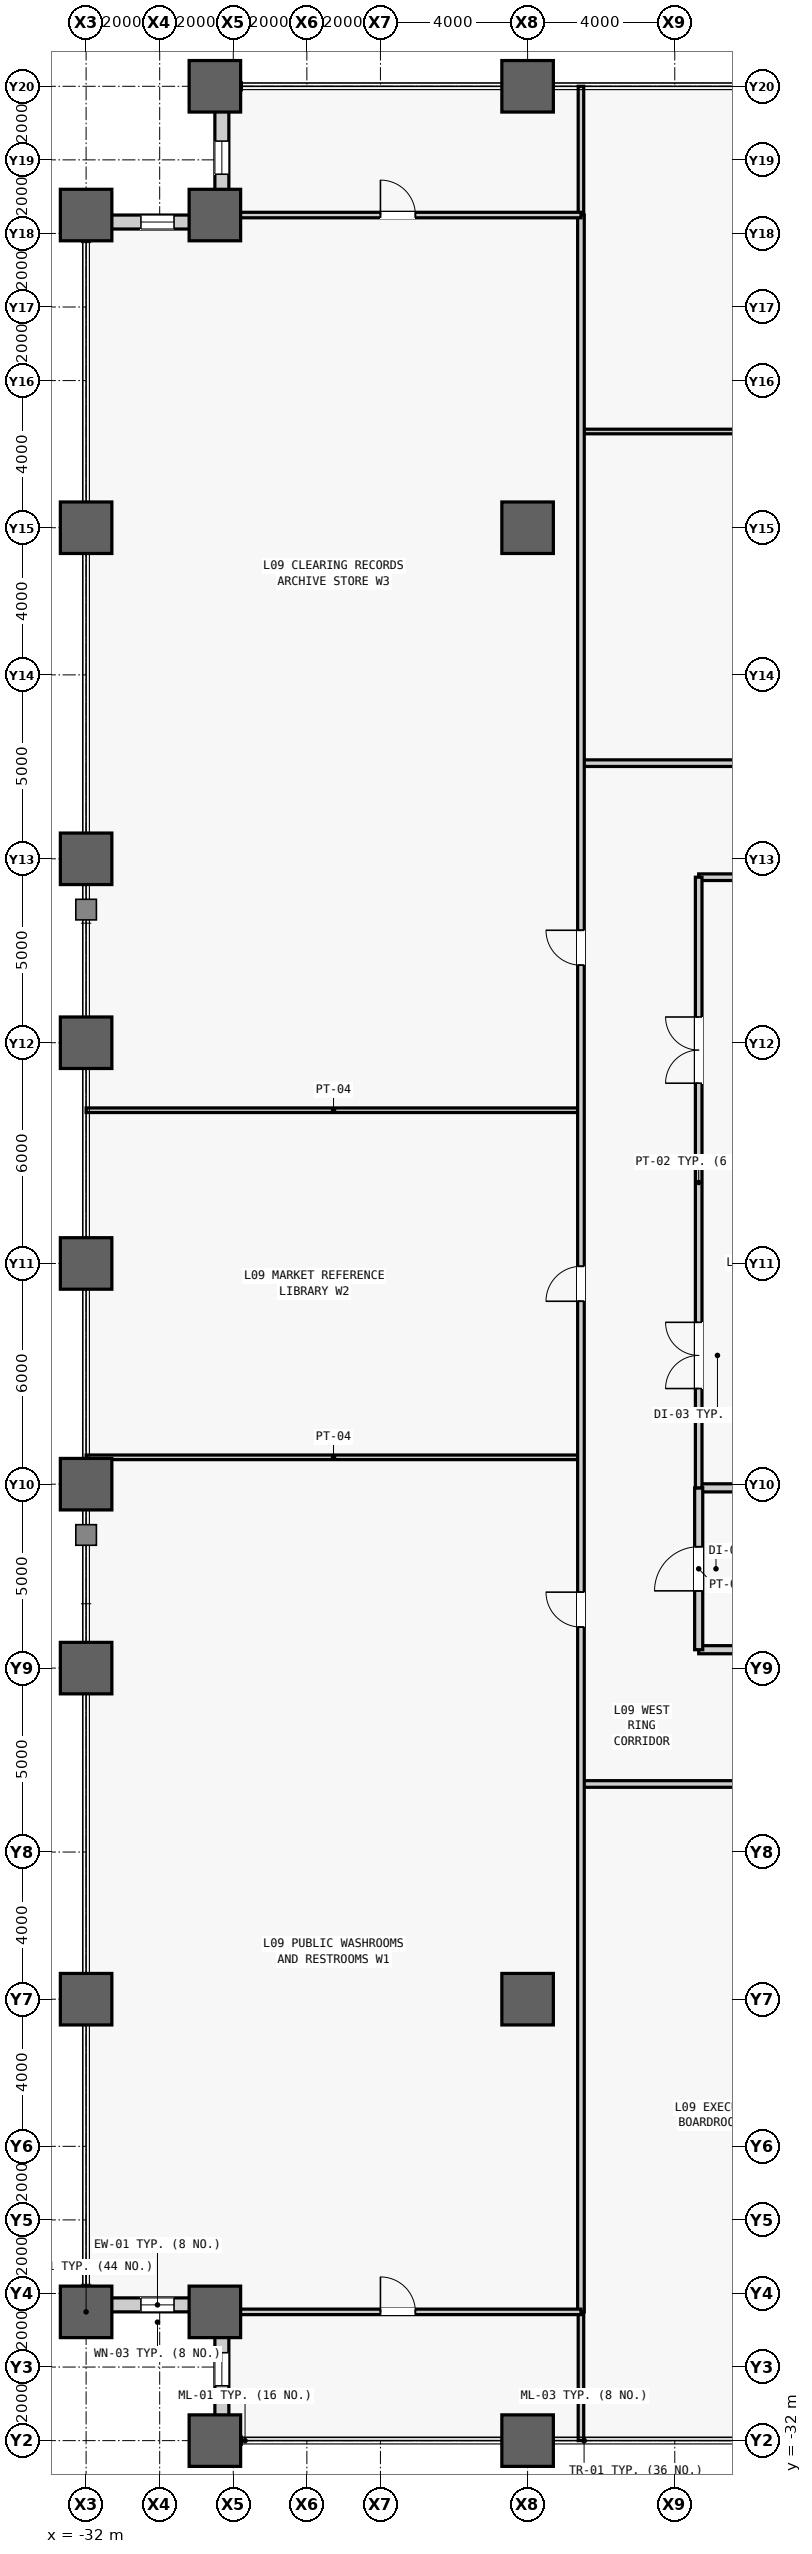
"""IFC4 building model, lengths in metres.
Left out: names, types, materials, properties, quantities, classifications, styles, units other than length and angle.
Written with IfcOpenShell. Run it as: python <this file> out.ifc"""

import sys

from ifc_helpers import new_model, si_unit, direction, frame, frame_2d, origin, origin_2d, place, context, subcontext, project, spatial, rectangle, hollow_rectangle, extrude, source, transform, mapped, element, fill, save


model = new_model("IFC4")
c1 = context("Model", 3, precision=1e-05, world=origin(), true_north=direction((0.0, 1.0)))
c2 = subcontext(c1, "Body", "Model", "MODEL_VIEW")
j1 = project(units=[si_unit("LENGTHUNIT", "METRE"), si_unit("PLANEANGLEUNIT", "RADIAN")], contexts=[c1])
p1 = place(None, origin())
s1 = spatial("IfcSite", under=j1, at=p1, CompositionType="ELEMENT")
p2 = place(p1, origin())
s2 = spatial("IfcBuilding", under=s1, at=p2, CompositionType="ELEMENT")
p3 = place(p2, frame((0.0, 0.0, 45.2)))
s3 = spatial("IfcBuildingStorey", under=s2, at=p3, CompositionType="ELEMENT", Elevation=45.2)
m1 = source(origin(), c2, "Body", "SweptSolid", [
    extrude(hollow_rectangle(XDim=1.4, YDim=1.4, WallThickness=0.075, at=origin_2d()), origin(), (0.0, 0.0, 1.0), 4.2),
])
for number, where, z_axis, x_axis in (
    (1, (-32.0, -28.5, 0.0), (0.0, 0.0, 1.0), (1.0, 0.0, 0.0)),
    (2, (-32.0, -20.0, 0.0), (0.0, 0.0, 1.0), (1.0, 0.0, 0.0)),
    (3, (-32.0, -11.0, 0.0), (0.0, 0.0, 1.0), (1.0, 0.0, 0.0)),
    (4, (-32.0, -6.0, 0.0), (0.0, 0.0, 1.0), (1.0, 0.0, 0.0)),
    (5, (-32.0, 0.0, 0.0), (0.0, 0.0, 1.0), (1.0, 0.0, 0.0)),
    (6, (-32.0, 6.0, 0.0), (0.0, 0.0, 1.0), (1.0, 0.0, 0.0)),
    (7, (-32.0, 11.0, 0.0), (0.0, 0.0, 1.0), (1.0, 0.0, 0.0)),
    (8, (-32.0, 20.0, 0.0), (0.0, 0.0, 1.0), (1.0, 0.0, 0.0)),
    (9, (-32.0, 28.5, 0.0), (0.0, 0.0, 1.0), (1.0, 0.0, 0.0)),
    (10, (-28.5, -32.0, 0.0), (0.0, 0.0, 1.0), (1.0, 0.0, 0.0)),
    (11, (-28.5, -28.5, 0.0), (0.0, 0.0, 1.0), (1.0, 0.0, 0.0)),
    (12, (-28.5, 28.5, 0.0), (0.0, 0.0, 1.0), (1.0, 0.0, 0.0)),
    (13, (-28.5, 32.0, 0.0), (0.0, 0.0, 1.0), (1.0, 0.0, 0.0)),
    (14, (-20.0, -32.0, 0.0), (0.0, 0.0, 1.0), (1.0, 0.0, 0.0)),
    (15, (-20.0, -20.0, 0.0), (0.0, 0.0, 1.0), (1.0, 0.0, 0.0)),
    (16, (-20.0, 20.0, 0.0), (0.0, 0.0, 1.0), (1.0, 0.0, 0.0)),
    (17, (-20.0, 32.0, 0.0), (0.0, 0.0, 1.0), (1.0, 0.0, 0.0)),
):
    element("IfcColumn", number, at=place(p3, frame(where, z_axis=z_axis, x_axis=x_axis)), inside=s3, PredefinedType="COLUMN", context=c2, shape_type="MappedRepresentation", body=[
        mapped(m1, transform((0.0, 0.0, 0.0), scale=1.0)),
    ])
m2 = source(origin(), c2, "Body", "SweptSolid", [
    extrude(rectangle(XDim=3.12, YDim=0.38, at=frame_2d((1.56, 0.0))), origin(), (0.0, 0.0, 1.0), 3.245),
])
p4 = place(p3, frame((-28.5, -28.31, 0.0), z_axis=(0.0, 0.0, 1.0), x_axis=(-1.0, 0.0, 0.0)))
e18 = element("IfcWall", 18, at=p4, inside=s3, PredefinedType="STANDARD", context=c2, shape_type="MappedRepresentation", body=[
    mapped(m2, transform((0.0, 0.0, 0.0), scale=1.0)),
])
m3 = source(origin(), c2, "Body", "SweptSolid", [
    extrude(rectangle(XDim=0.9, YDim=2.4, at=frame_2d((0.45, 1.2))), frame((0.0, 0.2, 0.0), z_axis=(0.0, -1.0, 0.0), x_axis=(1.0, 0.0, 0.0)), (0.0, 0.0, 1.0), 0.4),
])
p5 = place(p4, frame((1.11, 0.0, 0.5)))
e19 = element("IfcOpeningElement", 19, at=p5, cuts=e18, PredefinedType="OPENING", context=c2, shape_type="MappedRepresentation", body=[
    mapped(m3, transform((0.0, 0.0, 0.0), scale=1.0)),
])
p6 = place(p3, frame((-28.31, -31.62, 0.0), z_axis=(0.0, 0.0, 1.0), x_axis=(0.0, 1.0, 0.0)))
e20 = element("IfcWall", 20, at=p6, inside=s3, PredefinedType="STANDARD", context=c2, shape_type="MappedRepresentation", body=[
    mapped(m2, transform((0.0, 0.0, 0.0), scale=1.0)),
])
p7 = place(p6, frame((1.11, 0.0, 0.5)))
e21 = element("IfcOpeningElement", 21, at=p7, cuts=e20, PredefinedType="OPENING", context=c2, shape_type="MappedRepresentation", body=[
    mapped(m3, transform((0.0, 0.0, 0.0), scale=1.0)),
])
p8 = place(p3, frame((-28.31, 28.5, 0.0), z_axis=(0.0, 0.0, 1.0), x_axis=(0.0, 1.0, 0.0)))
e22 = element("IfcWall", 22, at=p8, inside=s3, PredefinedType="STANDARD", context=c2, shape_type="MappedRepresentation", body=[
    mapped(m2, transform((0.0, 0.0, 0.0), scale=1.0)),
])
p9 = place(p8, frame((1.11, 0.0, 0.5)))
e23 = element("IfcOpeningElement", 23, at=p9, cuts=e22, PredefinedType="OPENING", context=c2, shape_type="MappedRepresentation", body=[
    mapped(m3, transform((0.0, 0.0, 0.0), scale=1.0)),
])
p10 = place(p3, frame((-28.5, 28.31, 0.0), z_axis=(0.0, 0.0, 1.0), x_axis=(-1.0, 0.0, 0.0)))
e24 = element("IfcWall", 24, at=p10, inside=s3, PredefinedType="STANDARD", context=c2, shape_type="MappedRepresentation", body=[
    mapped(m2, transform((0.0, 0.0, 0.0), scale=1.0)),
])
p11 = place(p10, frame((1.11, 0.0, 0.5)))
e25 = element("IfcOpeningElement", 25, at=p11, cuts=e24, PredefinedType="OPENING", context=c2, shape_type="MappedRepresentation", body=[
    mapped(m3, transform((0.0, 0.0, 0.0), scale=1.0)),
])
m4 = source(origin(), c2, "Body", "SweptSolid", [
    extrude(rectangle(XDim=4.05, YDim=0.22, at=frame_2d((2.025, 0.0))), origin(), (0.0, 0.0, 1.0), 3.94),
])
p12 = place(p3, frame((-15.35, -10.5, 0.0), z_axis=(0.0, 0.0, 1.0), x_axis=(1.0, 0.0, 0.0)))
e26 = element("IfcWall", 26, at=p12, inside=s3, PredefinedType="PARTITIONING", context=c2, shape_type="MappedRepresentation", body=[
    mapped(m4, transform((0.0, 0.0, 0.0), scale=1.0)),
])
m5 = source(origin(), c2, "Body", "SweptSolid", [
    extrude(rectangle(XDim=4.05, YDim=0.22, at=frame_2d((2.025, 0.0))), origin(), (0.0, 0.0, 1.0), 3.085),
])
p13 = place(p3, frame((-15.35, -6.1, 0.0), z_axis=(0.0, 0.0, 1.0), x_axis=(1.0, 0.0, 0.0)))
e27 = element("IfcWall", 27, at=p13, inside=s3, PredefinedType="PARTITIONING", context=c2, shape_type="MappedRepresentation", body=[
    mapped(m5, transform((0.0, 0.0, 0.0), scale=1.0)),
])
m6 = source(origin(), c2, "Body", "SweptSolid", [
    extrude(rectangle(XDim=4.4, YDim=0.22, at=frame_2d((2.2, 0.0))), origin(), (0.0, 0.0, 1.0), 3.94),
])
p14 = place(p3, frame((-15.35, -10.5, 0.0), z_axis=(0.0, 0.0, 1.0), x_axis=(0.0, 1.0, 0.0)))
e28 = element("IfcWall", 28, at=p14, inside=s3, PredefinedType="PARTITIONING", context=c2, shape_type="MappedRepresentation", body=[
    mapped(m6, transform((0.0, 0.0, 0.0), scale=1.0)),
])
m7 = source(origin(), c2, "Body", "SweptSolid", [
    extrude(rectangle(XDim=1.2, YDim=2.2, at=frame_2d((0.6, 1.1))), frame((0.0, 0.12, 0.0), z_axis=(0.0, -1.0, 0.0), x_axis=(1.0, 0.0, 0.0)), (0.0, 0.0, 1.0), 0.24),
])
p15 = place(p14, frame((1.6, 0.0, 0.0)))
e29 = element("IfcOpeningElement", 29, at=p15, cuts=e28, PredefinedType="OPENING", context=c2, shape_type="MappedRepresentation", body=[
    mapped(m7, transform((0.0, 0.0, 0.0), scale=1.0)),
])
m8 = source(origin(), c2, "Body", "SweptSolid", [
    extrude(rectangle(XDim=4.05, YDim=0.18, at=frame_2d((2.025, 0.0))), origin(), (0.0, 0.0, 1.0), 3.94),
])
p16 = place(p3, frame((-15.35, 10.5, 0.0), z_axis=(0.0, 0.0, 1.0), x_axis=(1.0, 0.0, 0.0)))
e30 = element("IfcWall", 30, at=p16, inside=s3, PredefinedType="PARTITIONING", context=c2, shape_type="MappedRepresentation", body=[
    mapped(m8, transform((0.0, 0.0, 0.0), scale=1.0)),
])
m9 = source(origin(), c2, "Body", "SweptSolid", [
    extrude(rectangle(XDim=16.6, YDim=0.18, at=frame_2d((8.3, 0.0))), origin(), (0.0, 0.0, 1.0), 3.94),
])
p17 = place(p3, frame((-15.35, -6.1, 0.0), z_axis=(0.0, 0.0, 1.0), x_axis=(0.0, 1.0, 0.0)))
e31 = element("IfcWall", 31, at=p17, inside=s3, PredefinedType="PARTITIONING", context=c2, shape_type="MappedRepresentation", body=[
    mapped(m9, transform((0.0, 0.0, 0.0), scale=1.0)),
])
m10 = source(origin(), c2, "Body", "SweptSolid", [
    extrude(rectangle(XDim=1.8, YDim=2.25, at=frame_2d((0.9, 1.125))), frame((0.0, 0.1, 0.0), z_axis=(0.0, -1.0, 0.0), x_axis=(1.0, 0.0, 0.0)), (0.0, 0.0, 1.0), 0.2),
])
p18 = place(p17, frame((2.7, 0.0, 0.0)))
e32 = element("IfcOpeningElement", 32, at=p18, cuts=e31, PredefinedType="OPENING", context=c2, shape_type="MappedRepresentation", body=[
    mapped(m10, transform((0.0, 0.0, 0.0), scale=1.0)),
])
p19 = place(p17, frame((11.0, 0.0, 0.0)))
e33 = element("IfcOpeningElement", 33, at=p19, cuts=e31, PredefinedType="OPENING", context=c2, shape_type="MappedRepresentation", body=[
    mapped(m10, transform((0.0, 0.0, 0.0), scale=1.0)),
])
m11 = source(origin(), c2, "Body", "SweptSolid", [
    extrude(rectangle(XDim=37.95, YDim=0.18, at=frame_2d((18.975, 0.0))), origin(), (0.0, 0.0, 1.0), 3.94),
])
p20 = place(p3, frame((-18.55, -14.15, 0.0), z_axis=(0.0, 0.0, 1.0), x_axis=(1.0, 0.0, 0.0)))
e34 = element("IfcWall", 34, at=p20, inside=s3, PredefinedType="PARTITIONING", context=c2, shape_type="MappedRepresentation", body=[
    mapped(m11, transform((0.0, 0.0, 0.0), scale=1.0)),
])
m12 = source(origin(), c2, "Body", "SweptSolid", [
    extrude(rectangle(XDim=1.05, YDim=2.2, at=frame_2d((0.525, 1.1))), frame((0.0, 0.1, 0.0), z_axis=(0.0, -1.0, 0.0), x_axis=(1.0, 0.0, 0.0)), (0.0, 0.0, 1.0), 0.2),
])
p21 = place(p20, frame((5.345, 0.0, 0.0)))
e35 = element("IfcOpeningElement", 35, at=p21, cuts=e34, PredefinedType="OPENING", context=c2, shape_type="MappedRepresentation", body=[
    mapped(m12, transform((0.0, 0.0, 0.0), scale=1.0)),
])
p22 = place(p20, frame((11.809, 0.0, 0.0)))
e36 = element("IfcOpeningElement", 36, at=p22, cuts=e34, PredefinedType="OPENING", context=c2, shape_type="MappedRepresentation", body=[
    mapped(m12, transform((0.0, 0.0, 0.0), scale=1.0)),
])
p23 = place(p20, frame((21.296, 0.0, 0.0)))
e37 = element("IfcOpeningElement", 37, at=p23, cuts=e34, PredefinedType="OPENING", context=c2, shape_type="MappedRepresentation", body=[
    mapped(m12, transform((0.0, 0.0, 0.0), scale=1.0)),
])
p24 = place(p20, frame((29.076, 0.0, 0.0)))
e38 = element("IfcOpeningElement", 38, at=p24, cuts=e34, PredefinedType="OPENING", context=c2, shape_type="MappedRepresentation", body=[
    mapped(m12, transform((0.0, 0.0, 0.0), scale=1.0)),
])
m13 = source(origin(), c2, "Body", "SweptSolid", [
    extrude(rectangle(XDim=37.95, YDim=0.125, at=frame_2d((18.975, 0.0))), origin(), (0.0, 0.0, 1.0), 3.94),
])
p25 = place(p3, frame((-18.55, 22.616, 0.0), z_axis=(0.0, 0.0, 1.0), x_axis=(1.0, 0.0, 0.0)))
e39 = element("IfcWall", 39, at=p25, inside=s3, PredefinedType="PARTITIONING", context=c2, shape_type="MappedRepresentation", body=[
    mapped(m13, transform((0.0, 0.0, 0.0), scale=1.0)),
])
m14 = source(origin(), c2, "Body", "SweptSolid", [
    extrude(rectangle(XDim=0.95, YDim=2.15, at=frame_2d((0.475, 1.075))), frame((0.0, 0.073, 0.0), z_axis=(0.0, -1.0, 0.0), x_axis=(1.0, 0.0, 0.0)), (0.0, 0.0, 1.0), 0.145),
])
p26 = place(p25, frame((18.5, 0.0, 0.0)))
e40 = element("IfcOpeningElement", 40, at=p26, cuts=e39, PredefinedType="OPENING", context=c2, shape_type="MappedRepresentation", body=[
    mapped(m14, transform((0.0, 0.0, 0.0), scale=1.0)),
])
p27 = place(p3, frame((-18.55, 13.6, 0.0), z_axis=(0.0, 0.0, 1.0), x_axis=(1.0, 0.0, 0.0)))
e41 = element("IfcWall", 41, at=p27, inside=s3, PredefinedType="PARTITIONING", context=c2, shape_type="MappedRepresentation", body=[
    mapped(m11, transform((0.0, 0.0, 0.0), scale=1.0)),
])
p28 = place(p27, frame((18.025, 0.0, 0.0)))
e42 = element("IfcOpeningElement", 42, at=p28, cuts=e41, PredefinedType="OPENING", context=c2, shape_type="MappedRepresentation", body=[
    mapped(m12, transform((0.0, 0.0, 0.0), scale=1.0)),
])
m15 = source(origin(), c2, "Body", "SweptSolid", [
    extrude(rectangle(XDim=3.5, YDim=0.15, at=frame_2d((1.75, 0.0))), origin(), (0.0, 0.0, 1.0), 3.94),
])
for number, where, z_axis, x_axis in (
    (43, (-18.55, -32.0, 0.0), (0.0, 0.0, 1.0), (0.0, 1.0, 0.0)),
    (44, (-18.55, 28.5, 0.0), (0.0, 0.0, 1.0), (0.0, 1.0, 0.0)),
):
    element("IfcWall", number, at=place(p3, frame(where, z_axis=z_axis, x_axis=x_axis)), inside=s3, PredefinedType="PARTITIONING", context=c2, shape_type="MappedRepresentation", body=[
        mapped(m15, transform((0.0, 0.0, 0.0), scale=1.0)),
    ])
m16 = source(origin(), c2, "Body", "SweptSolid", [
    extrude(rectangle(XDim=13.45, YDim=0.125, at=frame_2d((6.725, 0.0))), origin(), (0.0, 0.0, 1.0), 3.94),
])
for number, where, z_axis, x_axis in (
    (45, (-32.0, -5.27, 0.0), (0.0, 0.0, 1.0), (1.0, 0.0, 0.0)),
    (46, (-32.0, 4.165, 0.0), (0.0, 0.0, 1.0), (1.0, 0.0, 0.0)),
):
    element("IfcWall", number, at=place(p3, frame(where, z_axis=z_axis, x_axis=x_axis)), inside=s3, PredefinedType="PARTITIONING", context=c2, shape_type="MappedRepresentation", body=[
        mapped(m16, transform((0.0, 0.0, 0.0), scale=1.0)),
    ])
m17 = source(origin(), c2, "Body", "SweptSolid", [
    extrude(rectangle(XDim=57.0, YDim=0.18, at=frame_2d((28.5, 0.0))), origin(), (0.0, 0.0, 1.0), 3.94),
])
p29 = place(p3, frame((-18.55, -28.5, 0.0), z_axis=(0.0, 0.0, 1.0), x_axis=(0.0, 1.0, 0.0)))
e47 = element("IfcWall", 47, at=p29, inside=s3, PredefinedType="PARTITIONING", context=c2, shape_type="MappedRepresentation", body=[
    mapped(m17, transform((0.0, 0.0, 0.0), scale=1.0)),
])
m18 = source(origin(), c2, "Body", "SweptSolid", [
    extrude(rectangle(XDim=0.95, YDim=2.15, at=frame_2d((0.475, 1.075))), frame((0.0, 0.1, 0.0), z_axis=(0.0, -1.0, 0.0), x_axis=(1.0, 0.0, 0.0)), (0.0, 0.0, 1.0), 0.2),
])
p30 = place(p29, frame((18.615, 0.0, 0.0)))
e48 = element("IfcOpeningElement", 48, at=p30, cuts=e47, PredefinedType="OPENING", context=c2, shape_type="MappedRepresentation", body=[
    mapped(m18, transform((0.0, 0.0, 0.0), scale=1.0)),
])
p31 = place(p29, frame((27.472, 0.0, 0.0)))
e49 = element("IfcOpeningElement", 49, at=p31, cuts=e47, PredefinedType="OPENING", context=c2, shape_type="MappedRepresentation", body=[
    mapped(m18, transform((0.0, 0.0, 0.0), scale=1.0)),
])
p32 = place(p29, frame((36.607, 0.0, 0.0)))
e50 = element("IfcOpeningElement", 50, at=p32, cuts=e47, PredefinedType="OPENING", context=c2, shape_type="MappedRepresentation", body=[
    mapped(m18, transform((0.0, 0.0, 0.0), scale=1.0)),
])
m19 = source(origin(), c2, "Body", "SweptSolid", [
    extrude(rectangle(XDim=9.95, YDim=0.15, at=frame_2d((4.975, 0.0))), origin(), (0.0, 0.0, 1.0), 3.94),
])
p33 = place(p3, frame((-28.5, -28.5, 0.0), z_axis=(0.0, 0.0, 1.0), x_axis=(1.0, 0.0, 0.0)))
e51 = element("IfcWall", 51, at=p33, inside=s3, PredefinedType="PARTITIONING", context=c2, shape_type="MappedRepresentation", body=[
    mapped(m19, transform((0.0, 0.0, 0.0), scale=1.0)),
])
m20 = source(origin(), c2, "Body", "SweptSolid", [
    extrude(rectangle(XDim=0.95, YDim=2.15, at=frame_2d((0.475, 1.075))), frame((0.0, 0.085, 0.0), z_axis=(0.0, -1.0, 0.0), x_axis=(1.0, 0.0, 0.0)), (0.0, 0.0, 1.0), 0.17),
])
p34 = place(p33, frame((4.5, 0.0, 0.0)))
e52 = element("IfcOpeningElement", 52, at=p34, cuts=e51, PredefinedType="OPENING", context=c2, shape_type="MappedRepresentation", body=[
    mapped(m20, transform((0.0, 0.0, 0.0), scale=1.0)),
])
p35 = place(p3, frame((-28.5, 28.5, 0.0), z_axis=(0.0, 0.0, 1.0), x_axis=(1.0, 0.0, 0.0)))
e53 = element("IfcWall", 53, at=p35, inside=s3, PredefinedType="PARTITIONING", context=c2, shape_type="MappedRepresentation", body=[
    mapped(m19, transform((0.0, 0.0, 0.0), scale=1.0)),
])
p36 = place(p35, frame((4.5, 0.0, 0.0)))
e54 = element("IfcOpeningElement", 54, at=p36, cuts=e53, PredefinedType="OPENING", context=c2, shape_type="MappedRepresentation", body=[
    mapped(m20, transform((0.0, 0.0, 0.0), scale=1.0)),
])
m21 = source(origin(), c2, "Body", "SweptSolid", [
    extrude(rectangle(XDim=0.9, YDim=2.4, at=frame_2d((0.45, 1.2))), frame((0.0, 0.03, 0.0), z_axis=(0.0, -1.0, 0.0), x_axis=(1.0, 0.0, 0.0)), (0.0, 0.0, 1.0), 0.06),
])
p37 = place(p5, origin())
e55 = element("IfcWindow", 55, at=p37, inside=s3, PartitioningType="SINGLE_PANEL", PredefinedType="WINDOW", context=c2, shape_type="MappedRepresentation", body=[
    mapped(m21, transform((0.0, 0.0, 0.0), scale=1.0)),
])
fill(e19, e55)
p38 = place(p7, origin())
e56 = element("IfcWindow", 56, at=p38, inside=s3, PartitioningType="SINGLE_PANEL", PredefinedType="WINDOW", context=c2, shape_type="MappedRepresentation", body=[
    mapped(m21, transform((0.0, 0.0, 0.0), scale=1.0)),
])
fill(e21, e56)
p39 = place(p9, origin())
e57 = element("IfcWindow", 57, at=p39, inside=s3, PartitioningType="SINGLE_PANEL", PredefinedType="WINDOW", context=c2, shape_type="MappedRepresentation", body=[
    mapped(m21, transform((0.0, 0.0, 0.0), scale=1.0)),
])
fill(e23, e57)
p40 = place(p11, origin())
e58 = element("IfcWindow", 58, at=p40, inside=s3, PartitioningType="SINGLE_PANEL", PredefinedType="WINDOW", context=c2, shape_type="MappedRepresentation", body=[
    mapped(m21, transform((0.0, 0.0, 0.0), scale=1.0)),
])
fill(e25, e58)
m22 = source(origin(), c2, "Body", "SweptSolid", [
    extrude(rectangle(XDim=1.2, YDim=2.2, at=frame_2d((0.6, 1.1))), frame((0.0, 0.025, 0.0), z_axis=(0.0, -1.0, 0.0), x_axis=(1.0, 0.0, 0.0)), (0.0, 0.0, 1.0), 0.05),
])
p41 = place(p15, origin())
e59 = element("IfcDoor", 59, at=p41, inside=s3, OperationType="SINGLE_SWING_LEFT", PredefinedType="DOOR", context=c2, shape_type="MappedRepresentation", body=[
    mapped(m22, transform((0.0, 0.0, 0.0), scale=1.0)),
])
fill(e29, e59)
m23 = source(origin(), c2, "Body", "SweptSolid", [
    extrude(rectangle(XDim=1.8, YDim=2.25, at=frame_2d((0.9, 1.125))), frame((0.0, 0.025, 0.0), z_axis=(0.0, -1.0, 0.0), x_axis=(1.0, 0.0, 0.0)), (0.0, 0.0, 1.0), 0.05),
])
p42 = place(p18, origin())
e60 = element("IfcDoor", 60, at=p42, inside=s3, OperationType="SINGLE_SWING_LEFT", PredefinedType="DOOR", context=c2, shape_type="MappedRepresentation", body=[
    mapped(m23, transform((0.0, 0.0, 0.0), scale=1.0)),
])
fill(e32, e60)
p43 = place(p19, origin())
e61 = element("IfcDoor", 61, at=p43, inside=s3, OperationType="SINGLE_SWING_RIGHT", PredefinedType="DOOR", context=c2, shape_type="MappedRepresentation", body=[
    mapped(m23, transform((0.0, 0.0, 0.0), scale=1.0)),
])
fill(e33, e61)
m24 = source(origin(), c2, "Body", "SweptSolid", [
    extrude(rectangle(XDim=0.95, YDim=2.15, at=frame_2d((0.475, 1.075))), frame((0.0, 0.025, 0.0), z_axis=(0.0, -1.0, 0.0), x_axis=(1.0, 0.0, 0.0)), (0.0, 0.0, 1.0), 0.05),
])
p44 = place(p30, origin())
e62 = element("IfcDoor", 62, at=p44, inside=s3, OperationType="SINGLE_SWING_RIGHT", PredefinedType="DOOR", context=c2, shape_type="MappedRepresentation", body=[
    mapped(m24, transform((0.0, 0.0, 0.0), scale=1.0)),
])
fill(e48, e62)
p45 = place(p31, origin())
e63 = element("IfcDoor", 63, at=p45, inside=s3, OperationType="SINGLE_SWING_LEFT", PredefinedType="DOOR", context=c2, shape_type="MappedRepresentation", body=[
    mapped(m24, transform((0.0, 0.0, 0.0), scale=1.0)),
])
fill(e49, e63)
p46 = place(p32, origin())
e64 = element("IfcDoor", 64, at=p46, inside=s3, OperationType="SINGLE_SWING_RIGHT", PredefinedType="DOOR", context=c2, shape_type="MappedRepresentation", body=[
    mapped(m24, transform((0.0, 0.0, 0.0), scale=1.0)),
])
fill(e50, e64)
p47 = place(p34, origin())
e65 = element("IfcDoor", 65, at=p47, inside=s3, OperationType="SINGLE_SWING_LEFT", PredefinedType="DOOR", context=c2, shape_type="MappedRepresentation", body=[
    mapped(m24, transform((0.0, 0.0, 0.0), scale=1.0)),
])
fill(e52, e65)
p48 = place(p36, origin())
e66 = element("IfcDoor", 66, at=p48, inside=s3, OperationType="SINGLE_SWING_LEFT", PredefinedType="DOOR", context=c2, shape_type="MappedRepresentation", body=[
    mapped(m24, transform((0.0, 0.0, 0.0), scale=1.0)),
])
fill(e54, e66)
save(model, sys.argv[1])
